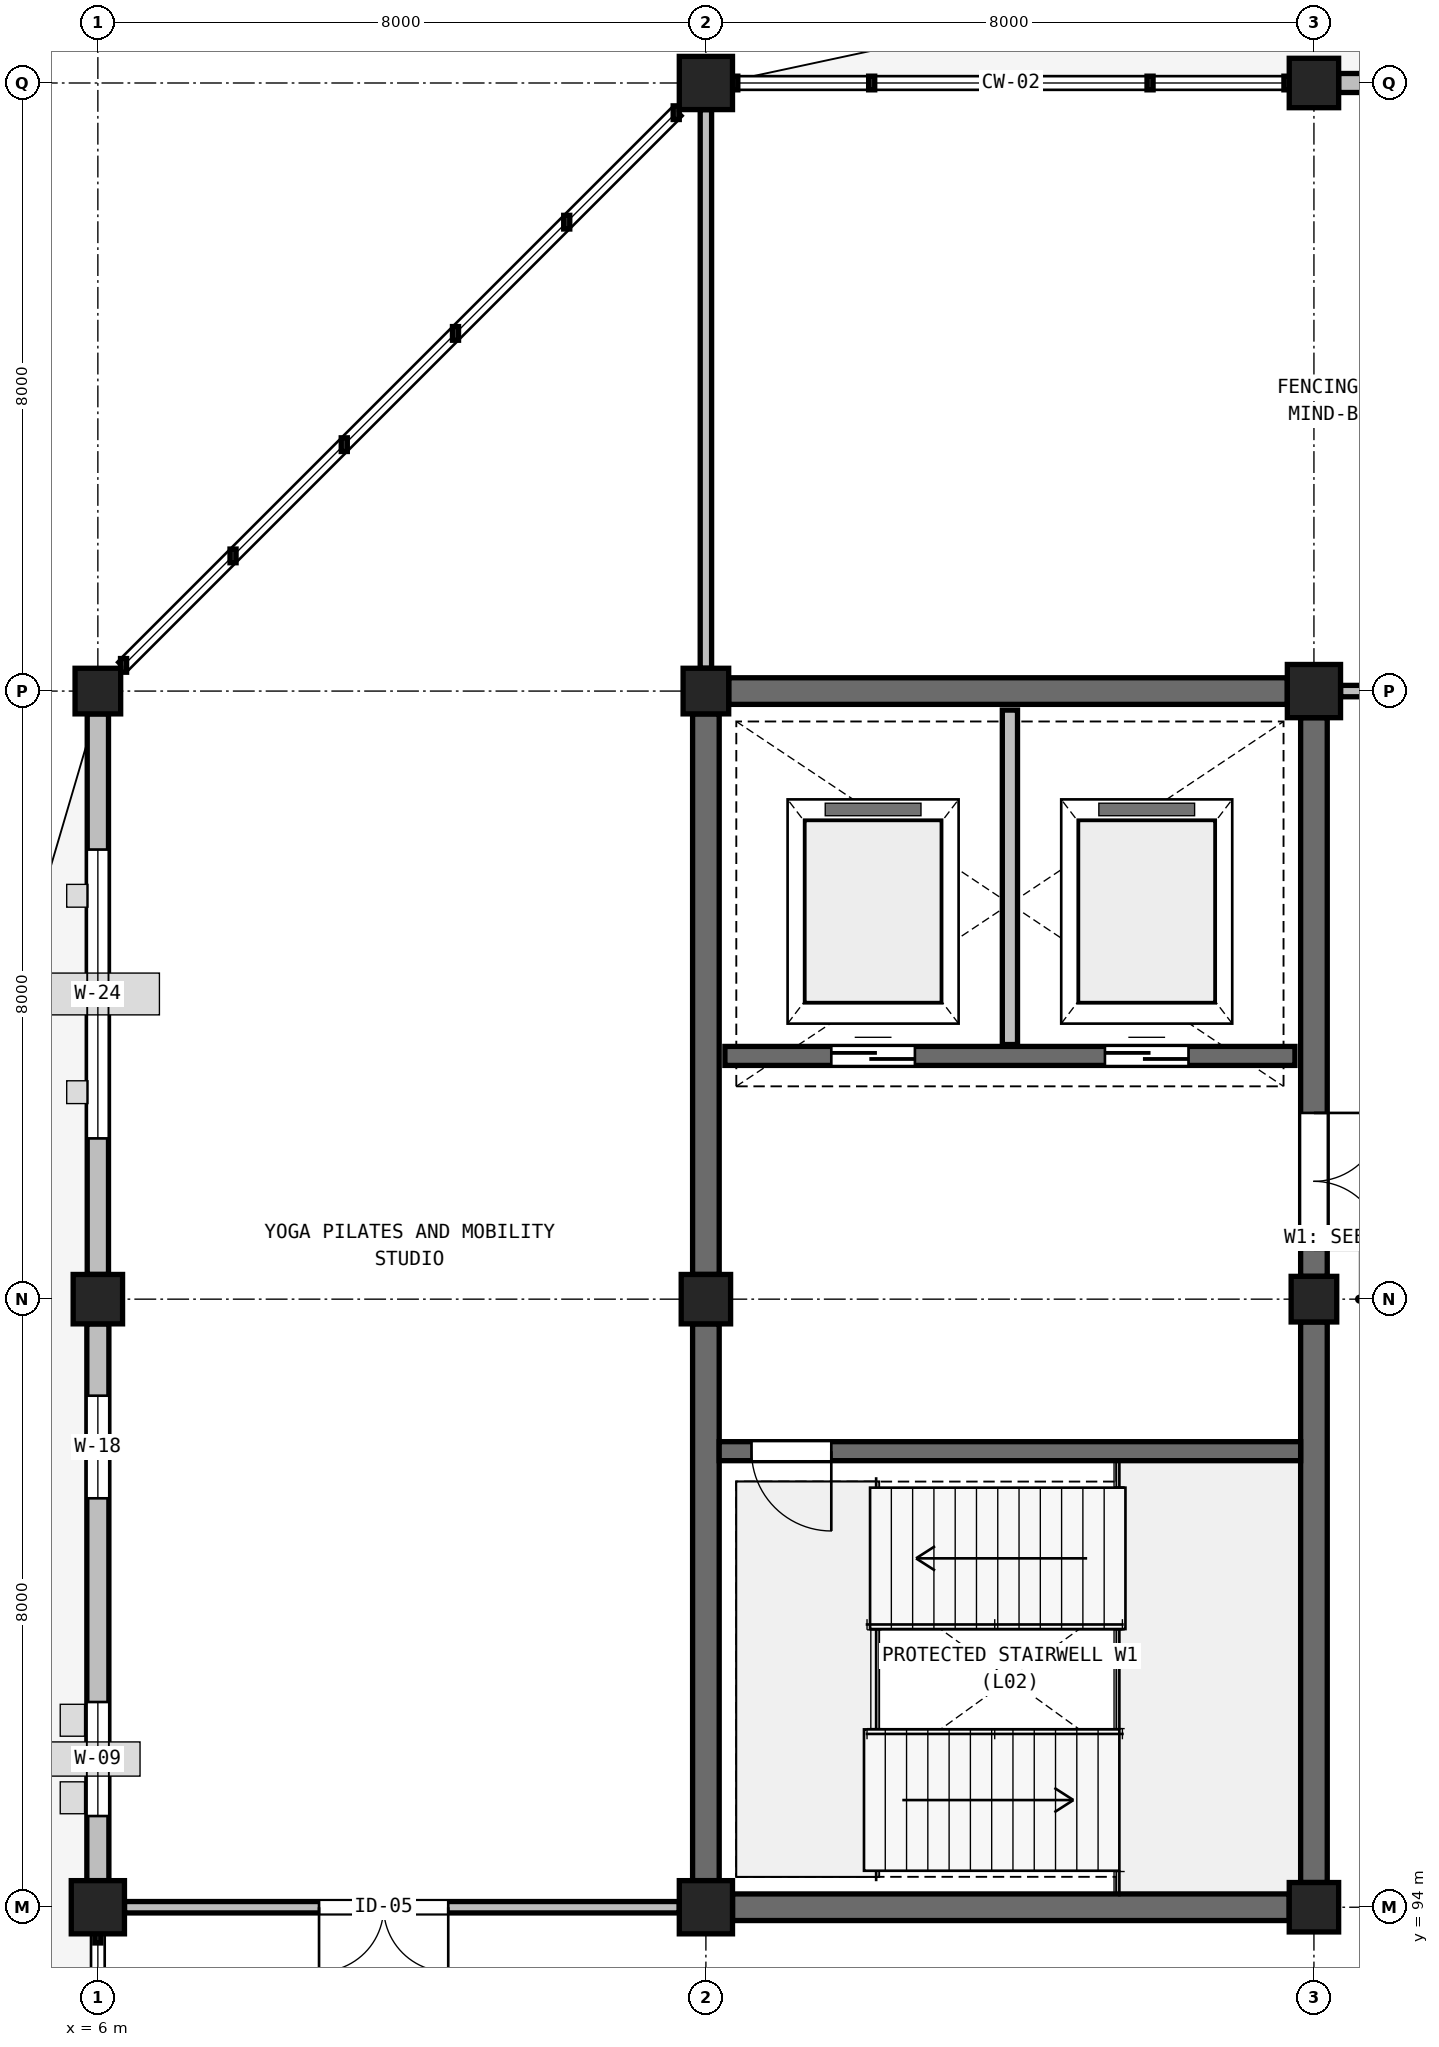
"""IFC4 building model, lengths in metres.
Left out: names, types, materials, properties, quantities, classifications, styles, units other than length and angle.
Written with IfcOpenShell. Run it as: python <this file> out.ifc"""

import sys

from ifc_helpers import new_model, si_unit, direction, frame, frame_2d, origin, origin_2d, place, context, subcontext, project, spatial, rectangle, extrude, element, fill, save


model = new_model("IFC4")
c1 = context("Model", 3, precision=1e-05, world=origin(), true_north=direction((0.0, 1.0)))
c2 = subcontext(c1, "Body", "Model", "MODEL_VIEW")
j1 = project(units=[si_unit("LENGTHUNIT", "METRE"), si_unit("PLANEANGLEUNIT", "RADIAN")], contexts=[c1])
p1 = place(None, origin())
s1 = spatial("IfcSite", under=j1, at=p1, CompositionType="ELEMENT")
p2 = place(p1, origin())
s2 = spatial("IfcBuilding", under=s1, at=p2, CompositionType="ELEMENT")
p3 = place(p2, frame((0.0, 0.0, 10.8)))
s3 = spatial("IfcBuildingStorey", under=s2, at=p3, CompositionType="ELEMENT", Elevation=10.8)
p4 = place(p3, frame((6.0, 94.0, 0.0), z_axis=(0.0, 0.0, 1.0), x_axis=(1.0, 0.0, 0.0)))
e1 = element("IfcColumn", 1, at=p4, inside=s3, PredefinedType="COLUMN", context=c2, shape_type="SweptSolid", body=[
    extrude(rectangle(XDim=0.7, YDim=0.7, at=origin_2d()), origin(), (0.0, 0.0, 1.0), 4.2),
])
p5 = place(p3, frame((6.0, 102.0, 0.0), z_axis=(0.0, 0.0, 1.0), x_axis=(1.0, 0.0, 0.0)))
e2 = element("IfcColumn", 2, at=p5, inside=s3, PredefinedType="COLUMN", context=c2, shape_type="SweptSolid", body=[
    extrude(rectangle(XDim=0.65, YDim=0.65, at=origin_2d()), origin(), (0.0, 0.0, 1.0), 4.2),
])
p6 = place(p3, frame((6.0, 110.0, 0.0), z_axis=(0.0, 0.0, 1.0), x_axis=(1.0, 0.0, 0.0)))
e3 = element("IfcColumn", 3, at=p6, inside=s3, PredefinedType="COLUMN", context=c2, shape_type="SweptSolid", body=[
    extrude(rectangle(XDim=0.6, YDim=0.6, at=origin_2d()), origin(), (0.0, 0.0, 1.0), 4.2),
])
p7 = place(p3, frame((14.0, 94.0, 0.0), z_axis=(0.0, 0.0, 1.0), x_axis=(1.0, 0.0, 0.0)))
e4 = element("IfcColumn", 4, at=p7, inside=s3, PredefinedType="COLUMN", context=c2, shape_type="SweptSolid", body=[
    extrude(rectangle(XDim=0.7, YDim=0.7, at=origin_2d()), origin(), (0.0, 0.0, 1.0), 4.2),
])
p8 = place(p3, frame((14.0, 102.0, 0.0), z_axis=(0.0, 0.0, 1.0), x_axis=(1.0, 0.0, 0.0)))
e5 = element("IfcColumn", 5, at=p8, inside=s3, PredefinedType="COLUMN", context=c2, shape_type="SweptSolid", body=[
    extrude(rectangle(XDim=0.65, YDim=0.65, at=origin_2d()), origin(), (0.0, 0.0, 1.0), 4.2),
])
p9 = place(p3, frame((14.0, 110.0, 0.0), z_axis=(0.0, 0.0, 1.0), x_axis=(1.0, 0.0, 0.0)))
e6 = element("IfcColumn", 6, at=p9, inside=s3, PredefinedType="COLUMN", context=c2, shape_type="SweptSolid", body=[
    extrude(rectangle(XDim=0.6, YDim=0.6, at=origin_2d()), origin(), (0.0, 0.0, 1.0), 4.2),
])
p10 = place(p3, frame((14.0, 118.0, 0.0), z_axis=(0.0, 0.0, 1.0), x_axis=(1.0, 0.0, 0.0)))
e7 = element("IfcColumn", 7, at=p10, inside=s3, PredefinedType="COLUMN", context=c2, shape_type="SweptSolid", body=[
    extrude(rectangle(XDim=0.7, YDim=0.7, at=origin_2d()), origin(), (0.0, 0.0, 1.0), 4.2),
])
p11 = place(p3, frame((22.0, 94.0, 0.0), z_axis=(0.0, 0.0, 1.0), x_axis=(1.0, 0.0, 0.0)))
e8 = element("IfcColumn", 8, at=p11, inside=s3, PredefinedType="COLUMN", context=c2, shape_type="SweptSolid", body=[
    extrude(rectangle(XDim=0.65, YDim=0.65, at=origin_2d()), origin(), (0.0, 0.0, 1.0), 4.2),
])
p12 = place(p3, frame((22.0, 102.0, 0.0), z_axis=(0.0, 0.0, 1.0), x_axis=(1.0, 0.0, 0.0)))
e9 = element("IfcColumn", 9, at=p12, inside=s3, PredefinedType="COLUMN", context=c2, shape_type="SweptSolid", body=[
    extrude(rectangle(XDim=0.6, YDim=0.6, at=origin_2d()), origin(), (0.0, 0.0, 1.0), 4.2),
])
p13 = place(p3, frame((22.0, 110.0, 0.0), z_axis=(0.0, 0.0, 1.0), x_axis=(1.0, 0.0, 0.0)))
e10 = element("IfcColumn", 10, at=p13, inside=s3, PredefinedType="COLUMN", context=c2, shape_type="SweptSolid", body=[
    extrude(rectangle(XDim=0.7, YDim=0.7, at=origin_2d()), origin(), (0.0, 0.0, 1.0), 4.2),
])
p14 = place(p3, frame((22.0, 118.0, 0.0), z_axis=(0.0, 0.0, 1.0), x_axis=(1.0, 0.0, 0.0)))
e11 = element("IfcColumn", 11, at=p14, inside=s3, PredefinedType="COLUMN", context=c2, shape_type="SweptSolid", body=[
    extrude(rectangle(XDim=0.65, YDim=0.65, at=origin_2d()), origin(), (0.0, 0.0, 1.0), 4.2),
])
p15 = place(p3, frame((22.325, 118.0, 0.0), z_axis=(0.0, 0.0, 1.0), x_axis=(1.0, 0.0, 0.0)))
e12 = element("IfcWall", 12, at=p15, inside=s3, PredefinedType="SOLIDWALL", context=c2, shape_type="SweptSolid", body=[
    extrude(rectangle(XDim=7.375, YDim=0.25, at=frame_2d((3.688, 0.0))), origin(), (0.0, 0.0, 1.0), 3.16),
])
p16 = place(p15, frame((0.85, 0.0, 0.75)))
e13 = element("IfcOpeningElement", 13, at=p16, cuts=e12, PredefinedType="OPENING", context=c2, shape_type="SweptSolid", body=[
    extrude(rectangle(XDim=1.8, YDim=1.8, at=frame_2d((0.9, 0.9))), frame((0.0, 0.135, 0.0), z_axis=(0.0, -1.0, 0.0), x_axis=(1.0, 0.0, 0.0)), (0.0, 0.0, 1.0), 0.27),
])
p17 = place(p15, frame((4.77, 0.0, 0.7)))
e14 = element("IfcOpeningElement", 14, at=p17, cuts=e12, PredefinedType="OPENING", context=c2, shape_type="SweptSolid", body=[
    extrude(rectangle(XDim=1.65, YDim=1.85, at=frame_2d((0.825, 0.925))), frame((0.0, 0.135, 0.0), z_axis=(0.0, -1.0, 0.0), x_axis=(1.0, 0.0, 0.0)), (0.0, 0.0, 1.0), 0.27),
])
p18 = place(p3, frame((6.0, 94.35, 0.0), z_axis=(0.0, 0.0, 1.0), x_axis=(0.0, 1.0, 0.0)))
e15 = element("IfcWall", 15, at=p18, inside=s3, PredefinedType="SOLIDWALL", context=c2, shape_type="SweptSolid", body=[
    extrude(rectangle(XDim=7.325, YDim=0.29, at=frame_2d((3.663, 0.0))), origin(), (0.0, 0.0, 1.0), 3.06),
])
p19 = place(p18, frame((0.85, 0.0, 1.05)))
e16 = element("IfcOpeningElement", 16, at=p19, cuts=e15, PredefinedType="OPENING", context=c2, shape_type="SweptSolid", body=[
    extrude(rectangle(XDim=1.5, YDim=1.5, at=frame_2d((0.75, 0.75))), frame((0.0, 0.155, 0.0), z_axis=(0.0, -1.0, 0.0), x_axis=(1.0, 0.0, 0.0)), (0.0, 0.0, 1.0), 0.31),
])
p20 = place(p18, frame((5.03, 0.0, 0.9)))
e17 = element("IfcOpeningElement", 17, at=p20, cuts=e15, PredefinedType="OPENING", context=c2, shape_type="SweptSolid", body=[
    extrude(rectangle(XDim=1.35, YDim=1.65, at=frame_2d((0.675, 0.825))), frame((0.0, 0.155, 0.0), z_axis=(0.0, -1.0, 0.0), x_axis=(1.0, 0.0, 0.0)), (0.0, 0.0, 1.0), 0.31),
])
p21 = place(p3, frame((6.0, 102.325, 0.0), z_axis=(0.0, 0.0, 1.0), x_axis=(0.0, 1.0, 0.0)))
e18 = element("IfcWall", 18, at=p21, inside=s3, PredefinedType="SOLIDWALL", context=c2, shape_type="SweptSolid", body=[
    extrude(rectangle(XDim=7.375, YDim=0.28, at=frame_2d((3.688, 0.0))), origin(), (0.0, 0.0, 1.0), 2.96),
])
p22 = place(p21, frame((1.79, 0.0, 1.0)))
e19 = element("IfcOpeningElement", 19, at=p22, cuts=e18, PredefinedType="OPENING", context=c2, shape_type="SweptSolid", body=[
    extrude(rectangle(XDim=3.8, YDim=1.55, at=frame_2d((1.9, 0.775))), frame((0.0, 0.15, 0.0), z_axis=(0.0, -1.0, 0.0), x_axis=(1.0, 0.0, 0.0)), (0.0, 0.0, 1.0), 0.3),
])
p23 = place(p3, frame((14.35, 94.0, 0.0), z_axis=(0.0, 0.0, 1.0), x_axis=(1.0, 0.0, 0.0)))
e20 = element("IfcWall", 20, at=p23, inside=s3, PredefinedType="SHEAR", context=c2, shape_type="SweptSolid", body=[
    extrude(rectangle(XDim=7.325, YDim=0.35, at=frame_2d((3.663, 0.0))), origin(), (0.0, 0.0, 1.0), 3.98),
])
p24 = place(p3, frame((14.3, 110.0, 0.0), z_axis=(0.0, 0.0, 1.0), x_axis=(1.0, 0.0, 0.0)))
e21 = element("IfcWall", 21, at=p24, inside=s3, PredefinedType="SHEAR", context=c2, shape_type="SweptSolid", body=[
    extrude(rectangle(XDim=7.35, YDim=0.35, at=frame_2d((3.675, 0.0))), origin(), (0.0, 0.0, 1.0), 3.98),
])
p25 = place(p3, frame((14.0, 94.35, 0.0), z_axis=(0.0, 0.0, 1.0), x_axis=(0.0, 1.0, 0.0)))
e22 = element("IfcWall", 22, at=p25, inside=s3, PredefinedType="SHEAR", context=c2, shape_type="SweptSolid", body=[
    extrude(rectangle(XDim=7.325, YDim=0.35, at=frame_2d((3.663, 0.0))), origin(), (0.0, 0.0, 1.0), 3.98),
])
for number, where, z_axis, x_axis in (
    (23, (14.0, 102.325, 0.0), (0.0, 0.0, 1.0), (0.0, 1.0, 0.0)),
    (24, (22.0, 94.325, 0.0), (0.0, 0.0, 1.0), (0.0, 1.0, 0.0)),
):
    element("IfcWall", number, at=place(p3, frame(where, z_axis=z_axis, x_axis=x_axis)), inside=s3, PredefinedType="SHEAR", context=c2, shape_type="SweptSolid", body=[
        extrude(rectangle(XDim=7.375, YDim=0.35, at=frame_2d((3.688, 0.0))), origin(), (0.0, 0.0, 1.0), 3.98),
    ])
p26 = place(p3, frame((22.0, 102.3, 0.0), z_axis=(0.0, 0.0, 1.0), x_axis=(0.0, 1.0, 0.0)))
e25 = element("IfcWall", 25, at=p26, inside=s3, PredefinedType="SHEAR", context=c2, shape_type="SweptSolid", body=[
    extrude(rectangle(XDim=7.35, YDim=0.35, at=frame_2d((3.675, 0.0))), origin(), (0.0, 0.0, 1.0), 3.98),
])
p27 = place(p26, frame((0.35, 0.0, 0.0)))
e26 = element("IfcOpeningElement", 26, at=p27, cuts=e25, PredefinedType="OPENING", context=c2, shape_type="SweptSolid", body=[
    extrude(rectangle(XDim=1.8, YDim=2.2, at=frame_2d((0.9, 1.1))), frame((0.0, 0.185, 0.0), z_axis=(0.0, -1.0, 0.0), x_axis=(1.0, 0.0, 0.0)), (0.0, 0.0, 1.0), 0.37),
])
p28 = place(p3, frame((14.175, 100.0, 0.0), z_axis=(0.0, 0.0, 1.0), x_axis=(1.0, 0.0, 0.0)))
e27 = element("IfcWall", 27, at=p28, inside=s3, PredefinedType="SOLIDWALL", context=c2, shape_type="SweptSolid", body=[
    extrude(rectangle(XDim=7.65, YDim=0.25, at=frame_2d((3.825, 0.0))), origin(), (0.0, 0.0, 1.0), 3.98),
])
p29 = place(p28, frame((0.425, 0.0, 0.0)))
e28 = element("IfcOpeningElement", 28, at=p29, cuts=e27, PredefinedType="OPENING", context=c2, shape_type="SweptSolid", body=[
    extrude(rectangle(XDim=1.05, YDim=2.2, at=frame_2d((0.525, 1.1))), frame((0.0, 0.135, 0.0), z_axis=(0.0, -1.0, 0.0), x_axis=(1.0, 0.0, 0.0)), (0.0, 0.0, 1.0), 0.27),
])
p30 = place(p3, frame((14.25, 105.2, 0.0), z_axis=(0.0, 0.0, 1.0), x_axis=(1.0, 0.0, 0.0)))
e29 = element("IfcWall", 29, at=p30, inside=s3, PredefinedType="SOLIDWALL", context=c2, shape_type="SweptSolid", body=[
    extrude(rectangle(XDim=7.5, YDim=0.25, at=frame_2d((3.75, 0.0))), origin(), (0.0, 0.0, 1.0), 3.98),
])
p31 = place(p30, frame((1.4, 0.0, 0.0)))
e30 = element("IfcOpeningElement", 30, at=p31, cuts=e29, PredefinedType="OPENING", context=c2, shape_type="SweptSolid", body=[
    extrude(rectangle(XDim=1.1, YDim=2.2, at=frame_2d((0.55, 1.1))), frame((0.0, 0.135, 0.0), z_axis=(0.0, -1.0, 0.0), x_axis=(1.0, 0.0, 0.0)), (0.0, 0.0, 1.0), 0.27),
])
p32 = place(p30, frame((5.0, 0.0, 0.0)))
e31 = element("IfcOpeningElement", 31, at=p32, cuts=e29, PredefinedType="OPENING", context=c2, shape_type="SweptSolid", body=[
    extrude(rectangle(XDim=1.1, YDim=2.2, at=frame_2d((0.55, 1.1))), frame((0.0, 0.135, 0.0), z_axis=(0.0, -1.0, 0.0), x_axis=(1.0, 0.0, 0.0)), (0.0, 0.0, 1.0), 0.27),
])
p33 = place(p3, frame((18.0, 105.35, 0.0), z_axis=(0.0, 0.0, 1.0), x_axis=(0.0, 1.0, 0.0)))
e32 = element("IfcWall", 32, at=p33, inside=s3, PredefinedType="PARTITIONING", context=c2, shape_type="SweptSolid", body=[
    extrude(rectangle(XDim=4.4, YDim=0.2, at=frame_2d((2.2, 0.0))), origin(), (0.0, 0.0, 1.0), 3.9),
])
p34 = place(p3, frame((6.35, 94.0, 0.0), z_axis=(0.0, 0.0, 1.0), x_axis=(1.0, 0.0, 0.0)))
e33 = element("IfcWall", 33, at=p34, inside=s3, PredefinedType="PARTITIONING", context=c2, shape_type="SweptSolid", body=[
    extrude(rectangle(XDim=7.3, YDim=0.15, at=frame_2d((3.65, 0.0))), origin(), (0.0, 0.0, 1.0), 3.06),
])
p35 = place(p34, frame((2.56, 0.0, 0.0)))
e34 = element("IfcOpeningElement", 34, at=p35, cuts=e33, PredefinedType="OPENING", context=c2, shape_type="SweptSolid", body=[
    extrude(rectangle(XDim=1.7, YDim=2.25, at=frame_2d((0.85, 1.125))), frame((0.0, 0.085, 0.0), z_axis=(0.0, -1.0, 0.0), x_axis=(1.0, 0.0, 0.0)), (0.0, 0.0, 1.0), 0.17),
])
p36 = place(p3, frame((14.0, 110.3, 0.0), z_axis=(0.0, 0.0, 1.0), x_axis=(0.0, 1.0, 0.0)))
e35 = element("IfcWall", 35, at=p36, inside=s3, PredefinedType="PARTITIONING", context=c2, shape_type="SweptSolid", body=[
    extrude(rectangle(XDim=7.35, YDim=0.15, at=frame_2d((3.675, 0.0))), origin(), (0.0, 0.0, 1.0), 3.24),
])
p37 = place(p3, frame((22.35, 110.0, 0.0), z_axis=(0.0, 0.0, 1.0), x_axis=(1.0, 0.0, 0.0)))
e36 = element("IfcWall", 36, at=p37, inside=s3, PredefinedType="PARTITIONING", context=c2, shape_type="SweptSolid", body=[
    extrude(rectangle(XDim=7.325, YDim=0.15, at=frame_2d((3.663, 0.0))), origin(), (0.0, 0.0, 1.0), 3.06),
])
p38 = place(p37, frame((2.56, 0.0, 0.0)))
e37 = element("IfcOpeningElement", 37, at=p38, cuts=e36, PredefinedType="OPENING", context=c2, shape_type="SweptSolid", body=[
    extrude(rectangle(XDim=1.7, YDim=2.25, at=frame_2d((0.85, 1.125))), frame((0.0, 0.085, 0.0), z_axis=(0.0, -1.0, 0.0), x_axis=(1.0, 0.0, 0.0)), (0.0, 0.0, 1.0), 0.17),
])
p39 = place(p19, origin())
e38 = element("IfcWindow", 38, at=p39, inside=s3, PartitioningType="SINGLE_PANEL", PredefinedType="WINDOW", context=c2, shape_type="SweptSolid", body=[
    extrude(rectangle(XDim=1.5, YDim=1.5, at=frame_2d((0.75, 0.75))), frame((0.0, 0.03, 0.0), z_axis=(0.0, -1.0, 0.0), x_axis=(1.0, 0.0, 0.0)), (0.0, 0.0, 1.0), 0.06),
])
fill(e16, e38)
p40 = place(p20, origin())
e39 = element("IfcWindow", 39, at=p40, inside=s3, PartitioningType="SINGLE_PANEL", PredefinedType="WINDOW", context=c2, shape_type="SweptSolid", body=[
    extrude(rectangle(XDim=1.35, YDim=1.65, at=frame_2d((0.675, 0.825))), frame((0.0, 0.03, 0.0), z_axis=(0.0, -1.0, 0.0), x_axis=(1.0, 0.0, 0.0)), (0.0, 0.0, 1.0), 0.06),
])
fill(e17, e39)
p41 = place(p22, origin())
e40 = element("IfcWindow", 40, at=p41, inside=s3, PartitioningType="SINGLE_PANEL", PredefinedType="WINDOW", context=c2, shape_type="SweptSolid", body=[
    extrude(rectangle(XDim=3.8, YDim=1.55, at=frame_2d((1.9, 0.775))), frame((0.0, 0.03, 0.0), z_axis=(0.0, -1.0, 0.0), x_axis=(1.0, 0.0, 0.0)), (0.0, 0.0, 1.0), 0.06),
])
fill(e19, e40)
p42 = place(p27, frame((1.8, 0.0, 0.0), z_axis=(0.0, 0.0, 1.0), x_axis=(-1.0, 0.0, 0.0)))
e41 = element("IfcDoor", 41, at=p42, inside=s3, OperationType="DOUBLE_DOOR_SINGLE_SWING", PredefinedType="DOOR", context=c2, shape_type="SweptSolid", body=[
    extrude(rectangle(XDim=1.8, YDim=2.2, at=frame_2d((0.9, 1.1))), frame((0.0, 0.025, 0.0), z_axis=(0.0, -1.0, 0.0), x_axis=(1.0, 0.0, 0.0)), (0.0, 0.0, 1.0), 0.05),
])
fill(e26, e41)
p43 = place(p29, frame((1.05, 0.0, 0.0), z_axis=(0.0, 0.0, 1.0), x_axis=(-1.0, 0.0, 0.0)))
e42 = element("IfcDoor", 42, at=p43, inside=s3, OperationType="SINGLE_SWING_RIGHT", PredefinedType="DOOR", context=c2, shape_type="SweptSolid", body=[
    extrude(rectangle(XDim=1.05, YDim=2.2, at=frame_2d((0.525, 1.1))), frame((0.0, 0.025, 0.0), z_axis=(0.0, -1.0, 0.0), x_axis=(1.0, 0.0, 0.0)), (0.0, 0.0, 1.0), 0.05),
])
fill(e28, e42)
p44 = place(p31, origin())
e43 = element("IfcDoor", 43, at=p44, inside=s3, OperationType="DOUBLE_DOOR_SLIDING", PredefinedType="DOOR", context=c2, shape_type="SweptSolid", body=[
    extrude(rectangle(XDim=1.1, YDim=2.2, at=frame_2d((0.55, 1.1))), frame((0.0, 0.025, 0.0), z_axis=(0.0, -1.0, 0.0), x_axis=(1.0, 0.0, 0.0)), (0.0, 0.0, 1.0), 0.05),
])
fill(e30, e43)
p45 = place(p32, origin())
e44 = element("IfcDoor", 44, at=p45, inside=s3, OperationType="DOUBLE_DOOR_SLIDING", PredefinedType="DOOR", context=c2, shape_type="SweptSolid", body=[
    extrude(rectangle(XDim=1.1, YDim=2.2, at=frame_2d((0.55, 1.1))), frame((0.0, 0.025, 0.0), z_axis=(0.0, -1.0, 0.0), x_axis=(1.0, 0.0, 0.0)), (0.0, 0.0, 1.0), 0.05),
])
fill(e31, e44)
p46 = place(p35, frame((1.7, 0.0, 0.0), z_axis=(0.0, 0.0, 1.0), x_axis=(-1.0, 0.0, 0.0)))
e45 = element("IfcDoor", 45, at=p46, inside=s3, OperationType="DOUBLE_DOOR_SINGLE_SWING", PredefinedType="DOOR", context=c2, shape_type="SweptSolid", body=[
    extrude(rectangle(XDim=1.7, YDim=2.25, at=frame_2d((0.85, 1.125))), frame((0.0, 0.025, 0.0), z_axis=(0.0, -1.0, 0.0), x_axis=(1.0, 0.0, 0.0)), (0.0, 0.0, 1.0), 0.05),
])
fill(e34, e45)
save(model, sys.argv[1])
